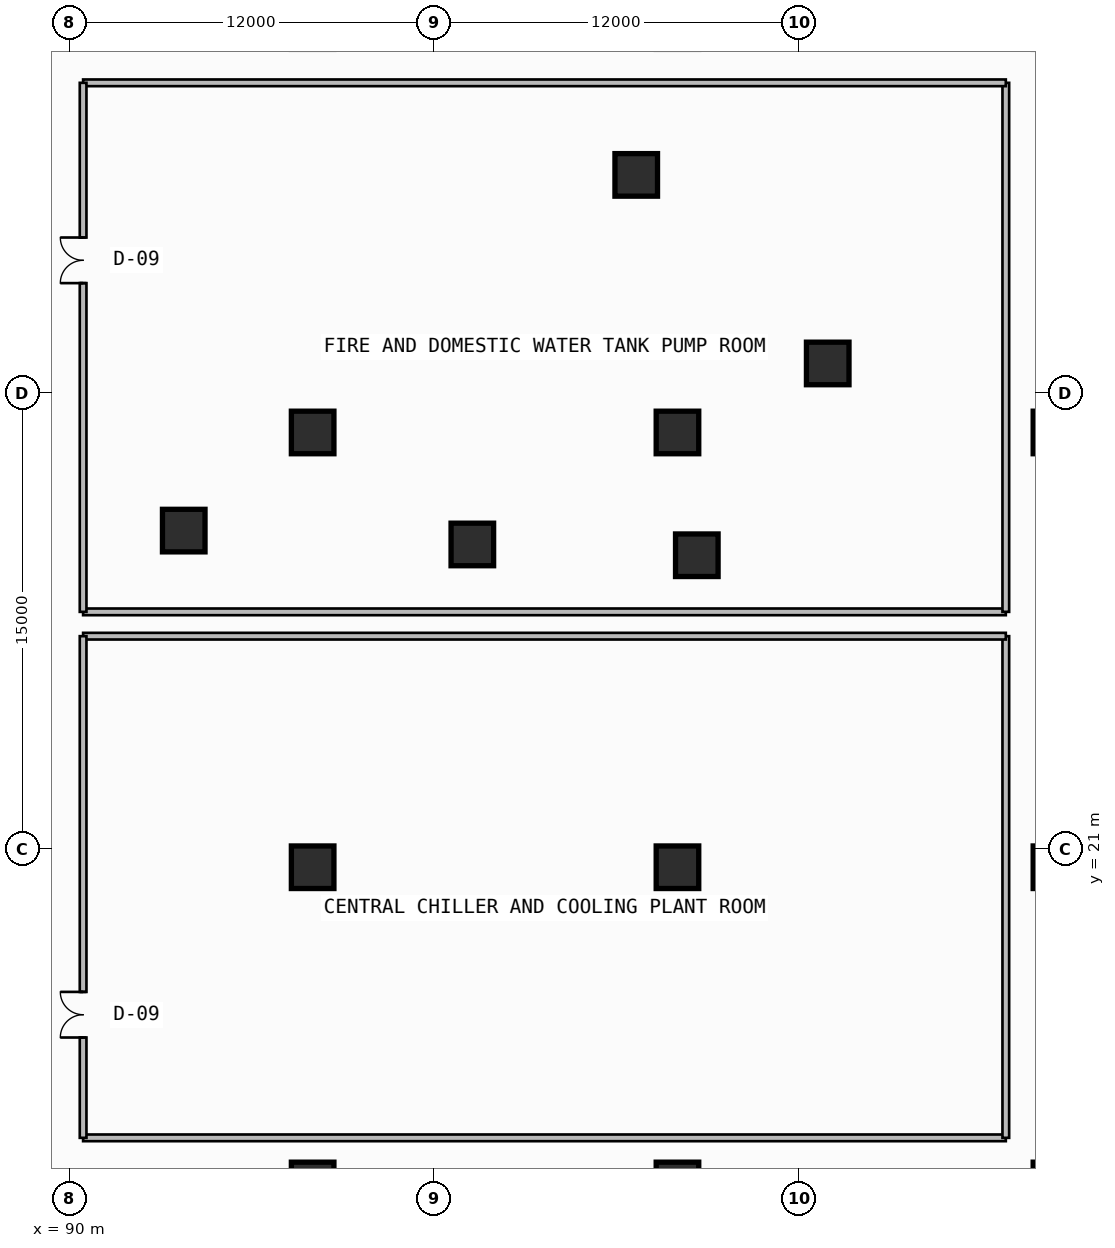
"""IFC4 building model, lengths in metres.
Left out: names, types, materials, properties, quantities, classifications, styles, units other than length and angle.
Written with IfcOpenShell. Run it as: python <this file> out.ifc"""

import sys

from ifc_helpers import new_model, si_unit, direction, frame, frame_2d, origin, origin_2d, place, context, subcontext, project, spatial, rectangle, extrude, element, fill, save


model = new_model("IFC4")
c1 = context("Model", 3, precision=1e-05, world=origin(), true_north=direction((0.0, 1.0)))
c2 = subcontext(c1, "Body", "Model", "MODEL_VIEW")
j1 = project(units=[si_unit("LENGTHUNIT", "METRE"), si_unit("PLANEANGLEUNIT", "RADIAN")], contexts=[c1])
p1 = place(None, origin())
s1 = spatial("IfcSite", under=j1, at=p1, CompositionType="ELEMENT")
p2 = place(p1, origin())
s2 = spatial("IfcBuilding", under=s1, at=p2, CompositionType="ELEMENT")
p3 = place(p2, frame((0.0, 0.0, -6.0)))
s3 = spatial("IfcBuildingStorey", under=s2, at=p3, CompositionType="ELEMENT", Elevation=-6.0)
for number, where, z_axis, x_axis in (
    (1, (98.0, 10.0, -0.6), (0.0, 0.0, 1.0), (1.0, 0.0, 0.0)),
    (2, (98.0, 20.4, -0.6), (0.0, 0.0, 1.0), (1.0, 0.0, 0.0)),
    (3, (98.0, 34.7, -0.6), (0.0, 0.0, 1.0), (1.0, 0.0, 0.0)),
    (4, (110.0, 10.0, -0.6), (0.0, 0.0, 1.0), (1.0, 0.0, 0.0)),
    (5, (110.0, 20.4, -0.6), (0.0, 0.0, 1.0), (1.0, 0.0, 0.0)),
    (6, (110.0, 34.7, -0.6), (0.0, 0.0, 1.0), (1.0, 0.0, 0.0)),
    (7, (122.4, 10.0, -0.6), (0.0, 0.0, 1.0), (1.0, 0.0, 0.0)),
    (8, (122.4, 20.4, -0.6), (0.0, 0.0, 1.0), (1.0, 0.0, 0.0)),
    (9, (122.4, 34.7, -0.6), (0.0, 0.0, 1.0), (1.0, 0.0, 0.0)),
    (10, (93.76, 31.472, -0.6), (0.0, 0.0, 1.0), (1.0, 0.0, 0.0)),
    (11, (103.253, 31.017, -0.6), (0.0, 0.0, 1.0), (1.0, 0.0, 0.0)),
    (12, (110.636, 30.662, -0.6), (0.0, 0.0, 1.0), (1.0, 0.0, 0.0)),
    (13, (114.942, 36.97, -0.6), (0.0, 0.0, 1.0), (1.0, 0.0, 0.0)),
    (14, (108.644, 43.172, -0.6), (0.0, 0.0, 1.0), (1.0, 0.0, 0.0)),
):
    element("IfcColumn", number, at=place(p3, frame(where, z_axis=z_axis, x_axis=x_axis)), inside=s3, PredefinedType="COLUMN", context=c2, shape_type="SweptSolid", body=[
        extrude(rectangle(XDim=1.4, YDim=1.4, at=origin_2d()), origin(), (0.0, 0.0, 1.0), 6.6),
    ])
p4 = place(p3, frame((90.45, 11.5, 0.0), z_axis=(0.0, 0.0, 1.0), x_axis=(1.0, 0.0, 0.0)))
e15 = element("IfcWall", 15, at=p4, inside=s3, PredefinedType="SOLIDWALL", context=c2, shape_type="SweptSolid", body=[
    extrude(rectangle(XDim=30.35, YDim=0.22, at=frame_2d((15.175, 0.0))), origin(), (0.0, 0.0, 1.0), 4.885),
])
p5 = place(p3, frame((120.8, 11.5, 0.0), z_axis=(0.0, 0.0, 1.0), x_axis=(0.0, 1.0, 0.0)))
e16 = element("IfcWall", 16, at=p5, inside=s3, PredefinedType="SOLIDWALL", context=c2, shape_type="SweptSolid", body=[
    extrude(rectangle(XDim=16.5, YDim=0.22, at=frame_2d((8.25, 0.0))), origin(), (0.0, 0.0, 1.0), 4.885),
])
p6 = place(p3, frame((120.8, 28.0, 0.0), z_axis=(0.0, 0.0, 1.0), x_axis=(-1.0, 0.0, 0.0)))
e17 = element("IfcWall", 17, at=p6, inside=s3, PredefinedType="SOLIDWALL", context=c2, shape_type="SweptSolid", body=[
    extrude(rectangle(XDim=30.35, YDim=0.22, at=frame_2d((15.175, 0.0))), origin(), (0.0, 0.0, 1.0), 4.885),
])
p7 = place(p3, frame((90.45, 28.0, 0.0), z_axis=(0.0, 0.0, 1.0), x_axis=(0.0, -1.0, 0.0)))
e18 = element("IfcWall", 18, at=p7, inside=s3, PredefinedType="SOLIDWALL", context=c2, shape_type="SweptSolid", body=[
    extrude(rectangle(XDim=16.5, YDim=0.22, at=frame_2d((8.25, 0.0))), origin(), (0.0, 0.0, 1.0), 4.885),
])
p8 = place(p7, frame((11.7, 0.0, 0.0)))
e19 = element("IfcOpeningElement", 19, at=p8, cuts=e18, PredefinedType="OPENING", context=c2, shape_type="SweptSolid", body=[
    extrude(rectangle(XDim=1.5, YDim=2.25, at=frame_2d((0.75, 1.125))), frame((0.0, 0.12, 0.0), z_axis=(0.0, -1.0, 0.0), x_axis=(1.0, 0.0, 0.0)), (0.0, 0.0, 1.0), 0.24),
])
p9 = place(p3, frame((90.45, 28.8, 0.0), z_axis=(0.0, 0.0, 1.0), x_axis=(1.0, 0.0, 0.0)))
e20 = element("IfcWall", 20, at=p9, inside=s3, PredefinedType="SOLIDWALL", context=c2, shape_type="SweptSolid", body=[
    extrude(rectangle(XDim=30.35, YDim=0.22, at=frame_2d((15.175, 0.0))), origin(), (0.0, 0.0, 1.0), 4.885),
])
p10 = place(p3, frame((120.8, 28.8, 0.0), z_axis=(0.0, 0.0, 1.0), x_axis=(0.0, 1.0, 0.0)))
e21 = element("IfcWall", 21, at=p10, inside=s3, PredefinedType="SOLIDWALL", context=c2, shape_type="SweptSolid", body=[
    extrude(rectangle(XDim=17.4, YDim=0.22, at=frame_2d((8.7, 0.0))), origin(), (0.0, 0.0, 1.0), 4.885),
])
p11 = place(p3, frame((120.8, 46.2, 0.0), z_axis=(0.0, 0.0, 1.0), x_axis=(-1.0, 0.0, 0.0)))
e22 = element("IfcWall", 22, at=p11, inside=s3, PredefinedType="SOLIDWALL", context=c2, shape_type="SweptSolid", body=[
    extrude(rectangle(XDim=30.35, YDim=0.22, at=frame_2d((15.175, 0.0))), origin(), (0.0, 0.0, 1.0), 4.885),
])
p12 = place(p3, frame((90.45, 46.2, 0.0), z_axis=(0.0, 0.0, 1.0), x_axis=(0.0, -1.0, 0.0)))
e23 = element("IfcWall", 23, at=p12, inside=s3, PredefinedType="SOLIDWALL", context=c2, shape_type="SweptSolid", body=[
    extrude(rectangle(XDim=17.4, YDim=0.22, at=frame_2d((8.7, 0.0))), origin(), (0.0, 0.0, 1.0), 4.885),
])
p13 = place(p12, frame((5.088, 0.0, 0.0)))
e24 = element("IfcOpeningElement", 24, at=p13, cuts=e23, PredefinedType="OPENING", context=c2, shape_type="SweptSolid", body=[
    extrude(rectangle(XDim=1.5, YDim=2.25, at=frame_2d((0.75, 1.125))), frame((0.0, 0.12, 0.0), z_axis=(0.0, -1.0, 0.0), x_axis=(1.0, 0.0, 0.0)), (0.0, 0.0, 1.0), 0.24),
])
p14 = place(p8, frame((1.5, 0.0, 0.0), z_axis=(0.0, 0.0, 1.0), x_axis=(-1.0, 0.0, 0.0)))
e25 = element("IfcDoor", 25, at=p14, inside=s3, OperationType="DOUBLE_DOOR_SINGLE_SWING", PredefinedType="DOOR", context=c2, shape_type="SweptSolid", body=[
    extrude(rectangle(XDim=1.5, YDim=2.25, at=frame_2d((0.75, 1.125))), frame((0.0, 0.025, 0.0), z_axis=(0.0, -1.0, 0.0), x_axis=(1.0, 0.0, 0.0)), (0.0, 0.0, 1.0), 0.05),
])
fill(e19, e25)
p15 = place(p13, frame((1.5, 0.0, 0.0), z_axis=(0.0, 0.0, 1.0), x_axis=(-1.0, 0.0, 0.0)))
e26 = element("IfcDoor", 26, at=p15, inside=s3, OperationType="DOUBLE_DOOR_SINGLE_SWING", PredefinedType="DOOR", context=c2, shape_type="SweptSolid", body=[
    extrude(rectangle(XDim=1.5, YDim=2.25, at=frame_2d((0.75, 1.125))), frame((0.0, 0.025, 0.0), z_axis=(0.0, -1.0, 0.0), x_axis=(1.0, 0.0, 0.0)), (0.0, 0.0, 1.0), 0.05),
])
fill(e24, e26)
save(model, sys.argv[1])
